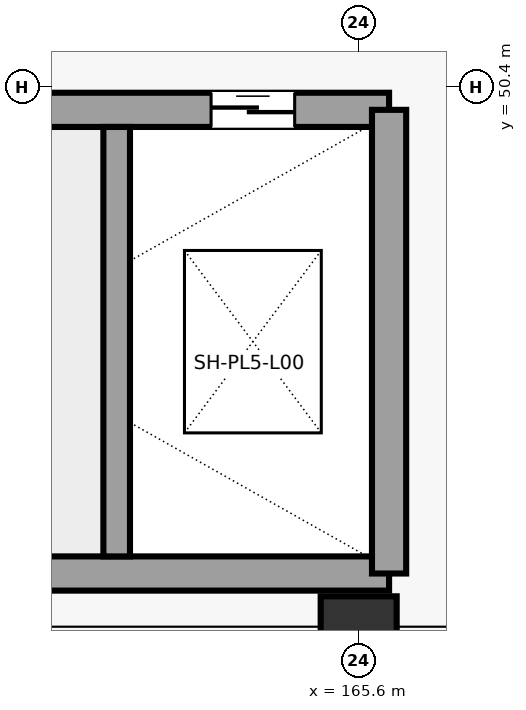
"""IFC4 building model, lengths in metres.
Left out: names, types, materials, properties, quantities, classifications, styles, units other than length and angle.
Written with IfcOpenShell. Run it as: python <this file> out.ifc"""

import sys

from ifc_helpers import new_model, si_unit, direction, frame, frame_2d, origin, origin_2d, place, context, subcontext, project, spatial, rectangle, circle, extrude, element, fill, save


model = new_model("IFC4")
c1 = context("Model", 3, precision=1e-05, world=origin(), true_north=direction((0.0, 1.0)))
c2 = subcontext(c1, "Body", "Model", "MODEL_VIEW")
j1 = project(units=[si_unit("LENGTHUNIT", "METRE"), si_unit("PLANEANGLEUNIT", "RADIAN")], contexts=[c1])
p1 = place(None, origin())
s1 = spatial("IfcSite", under=j1, at=p1, CompositionType="ELEMENT")
p2 = place(p1, origin())
s2 = spatial("IfcBuilding", under=s1, at=p2, CompositionType="ELEMENT")
p3 = place(p2, origin())
s3 = spatial("IfcBuildingStorey", under=s2, at=p3, CompositionType="ELEMENT", Elevation=0.0)
p4 = place(p3, frame((165.6, 43.2, 0.0), z_axis=(0.0, 0.0, 1.0), x_axis=(1.0, 0.0, 0.0)))
e1 = element("IfcColumn", 1, at=p4, inside=s3, PredefinedType="COLUMN", context=c2, shape_type="SweptSolid", body=[
    extrude(circle(Radius=0.5, at=origin_2d()), origin(), (0.0, 0.0, 1.0), 5.4),
])
p5 = place(p3, frame((153.2, 44.0, 0.0), z_axis=(0.0, 0.0, 1.0), x_axis=(1.0, 0.0, 0.0)))
e2 = element("IfcWall", 2, at=p5, inside=s3, PredefinedType="SHEAR", context=c2, shape_type="SweptSolid", body=[
    extrude(rectangle(XDim=12.8, YDim=0.45, at=frame_2d((6.4, 0.0))), origin(), (0.0, 0.0, 1.0), 5.06),
])
p6 = place(p3, frame((153.2, 50.1, 0.0), z_axis=(0.0, 0.0, 1.0), x_axis=(1.0, 0.0, 0.0)))
e3 = element("IfcWall", 3, at=p6, inside=s3, PredefinedType="SHEAR", context=c2, shape_type="SweptSolid", body=[
    extrude(rectangle(XDim=12.8, YDim=0.45, at=frame_2d((6.4, 0.0))), origin(), (0.0, 0.0, 1.0), 5.06),
])
p7 = place(p6, frame((0.55, 0.0, 0.0)))
e4 = element("IfcOpeningElement", 4, at=p7, cuts=e3, PredefinedType="OPENING", context=c2, shape_type="SweptSolid", body=[
    extrude(rectangle(XDim=1.2, YDim=2.25, at=frame_2d((0.6, 1.125))), frame((0.0, 0.235, 0.0), z_axis=(0.0, -1.0, 0.0), x_axis=(1.0, 0.0, 0.0)), (0.0, 0.0, 1.0), 0.47),
])
p8 = place(p6, frame((10.458, 0.0, 0.0)))
e5 = element("IfcOpeningElement", 5, at=p8, cuts=e3, PredefinedType="OPENING", context=c2, shape_type="SweptSolid", body=[
    extrude(rectangle(XDim=1.1, YDim=2.2, at=frame_2d((0.55, 1.1))), frame((0.0, 0.235, 0.0), z_axis=(0.0, -1.0, 0.0), x_axis=(1.0, 0.0, 0.0)), (0.0, 0.0, 1.0), 0.47),
])
p9 = place(p3, frame((166.0, 44.0, 0.0), z_axis=(0.0, 0.0, 1.0), x_axis=(0.0, 1.0, 0.0)))
e6 = element("IfcWall", 6, at=p9, inside=s3, PredefinedType="SHEAR", context=c2, shape_type="SweptSolid", body=[
    extrude(rectangle(XDim=6.1, YDim=0.45, at=frame_2d((3.05, 0.0))), origin(), (0.0, 0.0, 1.0), 5.06),
])
p10 = place(p3, frame((162.416, 44.225, 0.0), z_axis=(0.0, 0.0, 1.0), x_axis=(0.0, 1.0, 0.0)))
e7 = element("IfcWall", 7, at=p10, inside=s3, PredefinedType="SHEAR", context=c2, shape_type="SweptSolid", body=[
    extrude(rectangle(XDim=5.65, YDim=0.35, at=frame_2d((2.825, 0.0))), origin(), (0.0, 0.0, 1.0), 5.06),
])
p11 = place(p8, origin())
e8 = element("IfcDoor", 8, at=p11, inside=s3, OperationType="SLIDING_TO_RIGHT", PredefinedType="DOOR", context=c2, shape_type="SweptSolid", body=[
    extrude(rectangle(XDim=1.1, YDim=2.2, at=frame_2d((0.55, 1.1))), frame((0.0, 0.025, 0.0), z_axis=(0.0, -1.0, 0.0), x_axis=(1.0, 0.0, 0.0)), (0.0, 0.0, 1.0), 0.05),
])
fill(e5, e8)
save(model, sys.argv[1])
